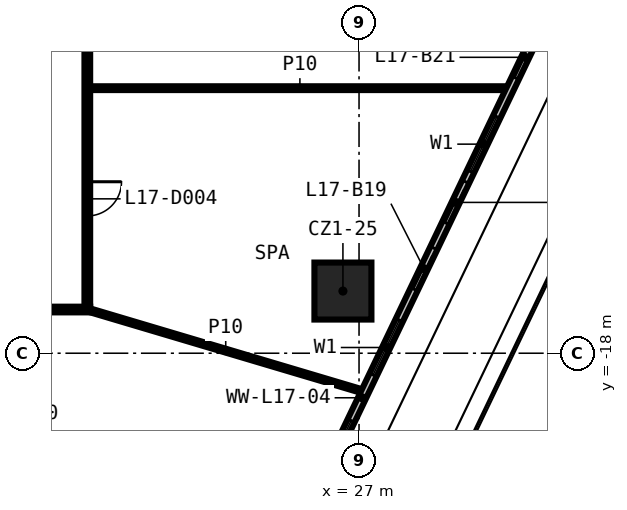
"""IFC4 building model, lengths in metres.
Left out: names, types, materials, properties, quantities, classifications, styles, units other than length and angle.
Written with IfcOpenShell. Run it as: python <this file> out.ifc"""

import sys

from ifc_helpers import new_model, si_unit, direction, frame, frame_2d, origin, origin_2d, place, context, subcontext, project, spatial, rectangle, extrude, element, fill, save


model = new_model("IFC4")
c1 = context("Model", 3, precision=1e-05, world=origin(), true_north=direction((0.0, 1.0)))
c2 = subcontext(c1, "Body", "Model", "MODEL_VIEW")
j1 = project(units=[si_unit("LENGTHUNIT", "METRE"), si_unit("PLANEANGLEUNIT", "RADIAN")], contexts=[c1])
p1 = place(None, origin())
s1 = spatial("IfcSite", under=j1, at=p1, CompositionType="ELEMENT")
p2 = place(p1, origin())
s2 = spatial("IfcBuilding", under=s1, at=p2, CompositionType="ELEMENT")
p3 = place(p2, frame((0.0, 0.0, 84.7)))
s3 = spatial("IfcBuildingStorey", under=s2, at=p3, CompositionType="ELEMENT", Elevation=84.7)
p4 = place(p3, frame((26.576, -16.364, 0.0), z_axis=(0.0, 0.0, 1.0), x_axis=(1.0, 0.0, 0.0)))
e1 = element("IfcColumn", 1, at=p4, inside=s3, PredefinedType="COLUMN", context=c2, shape_type="SweptSolid", body=[
    extrude(rectangle(XDim=1.5, YDim=1.5, at=origin_2d()), origin(), (0.0, 0.0, 1.0), 3.9),
])
p5 = place(p3, frame((19.925, -16.85, 0.0), z_axis=(0.0, 0.0, 1.0), x_axis=(-1.0, 0.0, 0.0)))
e2 = element("IfcWall", 2, at=p5, inside=s3, PredefinedType="PARTITIONING", context=c2, shape_type="SweptSolid", body=[
    extrude(rectangle(XDim=39.85, YDim=0.15, at=frame_2d((19.925, 0.0))), origin(), (0.0, 0.0, 1.0), 3.9),
])
p6 = place(p5, frame((31.112, 0.0, 0.0)))
e3 = element("IfcOpeningElement", 3, at=p6, cuts=e2, PredefinedType="OPENING", context=c2, shape_type="SweptSolid", body=[
    extrude(rectangle(XDim=0.9, YDim=2.1, at=frame_2d((0.45, 1.05))), frame((0.0, 0.085, 0.0), z_axis=(0.0, -1.0, 0.0), x_axis=(1.0, 0.0, 0.0)), (0.0, 0.0, 1.0), 0.17),
])
p7 = place(p5, frame((22.684, 0.0, 0.0)))
e4 = element("IfcOpeningElement", 4, at=p7, cuts=e2, PredefinedType="OPENING", context=c2, shape_type="SweptSolid", body=[
    extrude(rectangle(XDim=0.9, YDim=2.1, at=frame_2d((0.45, 1.05))), frame((0.0, 0.085, 0.0), z_axis=(0.0, -1.0, 0.0), x_axis=(1.0, 0.0, 0.0)), (0.0, 0.0, 1.0), 0.17),
])
p8 = place(p3, frame((19.925, -11.025, 0.0), z_axis=(0.0, 0.0, 1.0), x_axis=(1.0, 0.0, 0.0)))
e5 = element("IfcWall", 5, at=p8, inside=s3, PredefinedType="PARTITIONING", context=c2, shape_type="SweptSolid", body=[
    extrude(rectangle(XDim=11.038, YDim=0.1, at=frame_2d((5.519, 0.0))), origin(), (0.0, 0.0, 1.0), 3.9),
])
p9 = place(p3, frame((19.85, 16.775, 0.0), z_axis=(0.0, 0.0, 1.0), x_axis=(0.0, -1.0, 0.0)))
e6 = element("IfcWall", 6, at=p9, inside=s3, PredefinedType="PARTITIONING", context=c2, shape_type="SweptSolid", body=[
    extrude(rectangle(XDim=33.55, YDim=0.15, at=frame_2d((16.775, 0.0))), origin(), (0.0, 0.0, 1.0), 3.9),
])
p10 = place(p9, frame((30.262, 0.0, 0.0)))
e7 = element("IfcOpeningElement", 7, at=p10, cuts=e6, PredefinedType="OPENING", context=c2, shape_type="SweptSolid", body=[
    extrude(rectangle(XDim=0.9, YDim=2.1, at=frame_2d((0.45, 1.05))), frame((0.0, 0.085, 0.0), z_axis=(0.0, -1.0, 0.0), x_axis=(1.0, 0.0, 0.0)), (0.0, 0.0, 1.0), 0.17),
])
p11 = place(p9, frame((21.352, 0.0, 0.0)))
e8 = element("IfcOpeningElement", 8, at=p11, cuts=e6, PredefinedType="OPENING", context=c2, shape_type="SweptSolid", body=[
    extrude(rectangle(XDim=0.9, YDim=2.1, at=frame_2d((0.45, 1.05))), frame((0.0, 0.085, 0.0), z_axis=(0.0, -1.0, 0.0), x_axis=(1.0, 0.0, 0.0)), (0.0, 0.0, 1.0), 0.17),
])
p12 = place(p3, frame((19.85, -16.85, 0.0), z_axis=(0.0, 0.0, 1.0), x_axis=(0.958526393987, -0.285003775467, 0.0)))
e9 = element("IfcWall", 9, at=p12, inside=s3, PredefinedType="PARTITIONING", context=c2, shape_type="SweptSolid", body=[
    extrude(rectangle(XDim=7.599, YDim=0.1, at=frame_2d((3.8, 0.0))), origin(), (0.0, 0.0, 1.0), 3.9),
])
p13 = place(p3, frame((23.322, -27.019, 0.0), z_axis=(0.0, 0.0, 1.0), x_axis=(0.432099655508, 0.901825863296, 0.0)))
e10 = element("IfcWall", 10, at=p13, inside=s3, PredefinedType="SOLIDWALL", context=c2, shape_type="SweptSolid", body=[
    extrude(rectangle(XDim=26.603, YDim=0.2, at=frame_2d((13.302, 0.0))), origin(), (0.0, 0.0, 1.0), 3.9),
])
p14 = place(p13, frame((0.5, 0.0, 0.6)))
e11 = element("IfcOpeningElement", 11, at=p14, cuts=e10, PredefinedType="OPENING", context=c2, shape_type="SweptSolid", body=[
    extrude(rectangle(XDim=1.6, YDim=2.4, at=frame_2d((0.8, 1.2))), frame((0.0, 0.11, 0.0), z_axis=(0.0, -1.0, 0.0), x_axis=(1.0, 0.0, 0.0)), (0.0, 0.0, 1.0), 0.22),
])
p15 = place(p13, frame((3.0, 0.0, 0.0)))
e12 = element("IfcOpeningElement", 12, at=p15, cuts=e10, PredefinedType="OPENING", context=c2, shape_type="SweptSolid", body=[
    extrude(rectangle(XDim=1.2, YDim=2.4, at=frame_2d((0.6, 1.2))), frame((0.0, 0.11, 0.0), z_axis=(0.0, -1.0, 0.0), x_axis=(1.0, 0.0, 0.0)), (0.0, 0.0, 1.0), 0.22),
])
p16 = place(p13, frame((6.434, 0.0, 0.6)))
e13 = element("IfcOpeningElement", 13, at=p16, cuts=e10, PredefinedType="OPENING", context=c2, shape_type="SweptSolid", body=[
    extrude(rectangle(XDim=1.6, YDim=2.4, at=frame_2d((0.8, 1.2))), frame((0.0, 0.11, 0.0), z_axis=(0.0, -1.0, 0.0), x_axis=(1.0, 0.0, 0.0)), (0.0, 0.0, 1.0), 0.22),
])
p17 = place(p13, frame((4.934, 0.0, 0.0)))
e14 = element("IfcOpeningElement", 14, at=p17, cuts=e10, PredefinedType="OPENING", context=c2, shape_type="SweptSolid", body=[
    extrude(rectangle(XDim=1.2, YDim=2.4, at=frame_2d((0.6, 1.2))), frame((0.0, 0.11, 0.0), z_axis=(0.0, -1.0, 0.0), x_axis=(1.0, 0.0, 0.0)), (0.0, 0.0, 1.0), 0.22),
])
p18 = place(p13, frame((9.368, 0.0, 0.6)))
e15 = element("IfcOpeningElement", 15, at=p18, cuts=e10, PredefinedType="OPENING", context=c2, shape_type="SweptSolid", body=[
    extrude(rectangle(XDim=1.6, YDim=2.4, at=frame_2d((0.8, 1.2))), frame((0.0, 0.11, 0.0), z_axis=(0.0, -1.0, 0.0), x_axis=(1.0, 0.0, 0.0)), (0.0, 0.0, 1.0), 0.22),
])
p19 = place(p13, frame((11.868, 0.0, 0.0)))
e16 = element("IfcOpeningElement", 16, at=p19, cuts=e10, PredefinedType="OPENING", context=c2, shape_type="SweptSolid", body=[
    extrude(rectangle(XDim=1.2, YDim=2.4, at=frame_2d((0.6, 1.2))), frame((0.0, 0.11, 0.0), z_axis=(0.0, -1.0, 0.0), x_axis=(1.0, 0.0, 0.0)), (0.0, 0.0, 1.0), 0.22),
])
p20 = place(p13, frame((15.301, 0.0, 0.6)))
e17 = element("IfcOpeningElement", 17, at=p20, cuts=e10, PredefinedType="OPENING", context=c2, shape_type="SweptSolid", body=[
    extrude(rectangle(XDim=1.6, YDim=2.4, at=frame_2d((0.8, 1.2))), frame((0.0, 0.11, 0.0), z_axis=(0.0, -1.0, 0.0), x_axis=(1.0, 0.0, 0.0)), (0.0, 0.0, 1.0), 0.22),
])
p21 = place(p13, frame((13.801, 0.0, 0.0)))
e18 = element("IfcOpeningElement", 18, at=p21, cuts=e10, PredefinedType="OPENING", context=c2, shape_type="SweptSolid", body=[
    extrude(rectangle(XDim=1.2, YDim=2.4, at=frame_2d((0.6, 1.2))), frame((0.0, 0.11, 0.0), z_axis=(0.0, -1.0, 0.0), x_axis=(1.0, 0.0, 0.0)), (0.0, 0.0, 1.0), 0.22),
])
p22 = place(p13, frame((19.735, 0.0, 0.6)))
e19 = element("IfcOpeningElement", 19, at=p22, cuts=e10, PredefinedType="OPENING", context=c2, shape_type="SweptSolid", body=[
    extrude(rectangle(XDim=1.6, YDim=2.4, at=frame_2d((0.8, 1.2))), frame((0.0, 0.11, 0.0), z_axis=(0.0, -1.0, 0.0), x_axis=(1.0, 0.0, 0.0)), (0.0, 0.0, 1.0), 0.22),
])
p23 = place(p13, frame((18.035, 0.0, 0.0)))
e20 = element("IfcOpeningElement", 20, at=p23, cuts=e10, PredefinedType="OPENING", context=c2, shape_type="SweptSolid", body=[
    extrude(rectangle(XDim=1.2, YDim=2.4, at=frame_2d((0.6, 1.2))), frame((0.0, 0.11, 0.0), z_axis=(0.0, -1.0, 0.0), x_axis=(1.0, 0.0, 0.0)), (0.0, 0.0, 1.0), 0.22),
])
p24 = place(p13, frame((24.169, 0.0, 0.6)))
e21 = element("IfcOpeningElement", 21, at=p24, cuts=e10, PredefinedType="OPENING", context=c2, shape_type="SweptSolid", body=[
    extrude(rectangle(XDim=1.6, YDim=2.4, at=frame_2d((0.8, 1.2))), frame((0.0, 0.11, 0.0), z_axis=(0.0, -1.0, 0.0), x_axis=(1.0, 0.0, 0.0)), (0.0, 0.0, 1.0), 0.22),
])
p25 = place(p13, frame((22.669, 0.0, 0.0)))
e22 = element("IfcOpeningElement", 22, at=p25, cuts=e10, PredefinedType="OPENING", context=c2, shape_type="SweptSolid", body=[
    extrude(rectangle(XDim=1.2, YDim=2.4, at=frame_2d((0.6, 1.2))), frame((0.0, 0.11, 0.0), z_axis=(0.0, -1.0, 0.0), x_axis=(1.0, 0.0, 0.0)), (0.0, 0.0, 1.0), 0.22),
])
p26 = place(p10, origin())
e23 = element("IfcDoor", 23, at=p26, inside=s3, OperationType="SINGLE_SWING_RIGHT", PredefinedType="DOOR", context=c2, shape_type="SweptSolid", body=[
    extrude(rectangle(XDim=0.9, YDim=2.1, at=frame_2d((0.45, 1.05))), frame((0.0, 0.025, 0.0), z_axis=(0.0, -1.0, 0.0), x_axis=(1.0, 0.0, 0.0)), (0.0, 0.0, 1.0), 0.05),
])
fill(e7, e23)
p27 = place(p16, origin())
e24 = element("IfcWindow", 24, at=p27, inside=s3, PartitioningType="SINGLE_PANEL", PredefinedType="WINDOW", context=c2, shape_type="SweptSolid", body=[
    extrude(rectangle(XDim=1.6, YDim=2.4, at=frame_2d((0.8, 1.2))), frame((0.0, 0.03, 0.0), z_axis=(0.0, -1.0, 0.0), x_axis=(1.0, 0.0, 0.0)), (0.0, 0.0, 1.0), 0.06),
])
fill(e13, e24)
p28 = place(p18, origin())
e25 = element("IfcWindow", 25, at=p28, inside=s3, PartitioningType="SINGLE_PANEL", PredefinedType="WINDOW", context=c2, shape_type="SweptSolid", body=[
    extrude(rectangle(XDim=1.6, YDim=2.4, at=frame_2d((0.8, 1.2))), frame((0.0, 0.03, 0.0), z_axis=(0.0, -1.0, 0.0), x_axis=(1.0, 0.0, 0.0)), (0.0, 0.0, 1.0), 0.06),
])
fill(e15, e25)
p29 = place(p19, origin())
e26 = element("IfcDoor", 26, at=p29, inside=s3, OperationType="SLIDING_TO_LEFT", PredefinedType="DOOR", context=c2, shape_type="SweptSolid", body=[
    extrude(rectangle(XDim=1.2, YDim=2.4, at=frame_2d((0.6, 1.2))), frame((0.0, 0.025, 0.0), z_axis=(0.0, -1.0, 0.0), x_axis=(1.0, 0.0, 0.0)), (0.0, 0.0, 1.0), 0.05),
])
fill(e16, e26)
p30 = place(p20, origin())
e27 = element("IfcWindow", 27, at=p30, inside=s3, PartitioningType="SINGLE_PANEL", PredefinedType="WINDOW", context=c2, shape_type="SweptSolid", body=[
    extrude(rectangle(XDim=1.6, YDim=2.4, at=frame_2d((0.8, 1.2))), frame((0.0, 0.03, 0.0), z_axis=(0.0, -1.0, 0.0), x_axis=(1.0, 0.0, 0.0)), (0.0, 0.0, 1.0), 0.06),
])
fill(e17, e27)
p31 = place(p21, origin())
e28 = element("IfcDoor", 28, at=p31, inside=s3, OperationType="SLIDING_TO_LEFT", PredefinedType="DOOR", context=c2, shape_type="SweptSolid", body=[
    extrude(rectangle(XDim=1.2, YDim=2.4, at=frame_2d((0.6, 1.2))), frame((0.0, 0.025, 0.0), z_axis=(0.0, -1.0, 0.0), x_axis=(1.0, 0.0, 0.0)), (0.0, 0.0, 1.0), 0.05),
])
fill(e18, e28)
p32 = place(p23, origin())
e29 = element("IfcDoor", 29, at=p32, inside=s3, OperationType="SLIDING_TO_LEFT", PredefinedType="DOOR", context=c2, shape_type="SweptSolid", body=[
    extrude(rectangle(XDim=1.2, YDim=2.4, at=frame_2d((0.6, 1.2))), frame((0.0, 0.025, 0.0), z_axis=(0.0, -1.0, 0.0), x_axis=(1.0, 0.0, 0.0)), (0.0, 0.0, 1.0), 0.05),
])
fill(e20, e29)
save(model, sys.argv[1])
